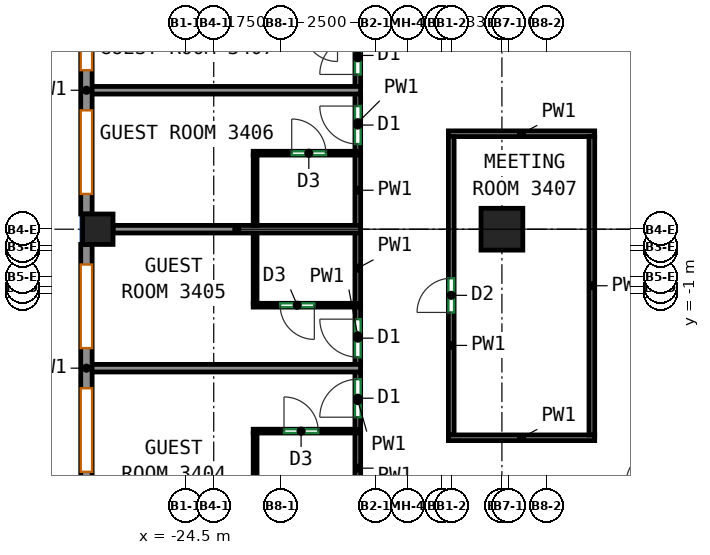
"""IFC4 building model, lengths in metres.
Left out: names, types, materials, properties, quantities, classifications, styles, units other than length and angle.
Written with IfcOpenShell. Run it as: python <this file> out.ifc"""

import sys

from ifc_helpers import new_model, si_unit, direction, frame, frame_2d, origin, origin_2d, place, context, subcontext, project, spatial, rectangle, extrude, source, transform, mapped, element, fill, save


model = new_model("IFC4")
c1 = context("Model", 3, precision=1e-05, world=origin(), true_north=direction((0.0, 1.0)))
c2 = subcontext(c1, "Body", "Model", "MODEL_VIEW")
j1 = project(units=[si_unit("LENGTHUNIT", "METRE"), si_unit("PLANEANGLEUNIT", "RADIAN")], contexts=[c1])
p1 = place(None, origin())
s1 = spatial("IfcSite", under=j1, at=p1, CompositionType="ELEMENT")
p2 = place(p1, origin())
s2 = spatial("IfcBuilding", under=s1, at=p2, CompositionType="ELEMENT")
p3 = place(p2, frame((0.0, 0.0, 150.7)))
s3 = spatial("IfcBuildingStorey", under=s2, at=p3, CompositionType="ELEMENT", Elevation=150.7)
m1 = source(origin(), c2, "Body", "SweptSolid", [
    extrude(rectangle(XDim=0.8, YDim=0.8, at=origin_2d()), origin(), (0.0, 0.0, 1.0), 3.12),
])
p4 = place(p3, frame((-26.8, 0.688, 0.0), z_axis=(0.0, 0.0, 1.0), x_axis=(1.0, 0.0, 0.0)))
e1 = element("IfcColumn", 1, at=p4, inside=s3, PredefinedType="COLUMN", context=c2, shape_type="MappedRepresentation", body=[
    mapped(m1, transform((0.0, 0.0, 0.0))),
])
m2 = source(origin(), c2, "Body", "SweptSolid", [
    extrude(rectangle(XDim=1.1, YDim=1.1, at=origin_2d()), origin(), (0.0, 0.0, 1.0), 3.12),
])
p5 = place(p3, frame((-16.167, 0.688, 0.0), z_axis=(0.0, 0.0, 1.0), x_axis=(1.0, 0.0, 0.0)))
e2 = element("IfcColumn", 2, at=p5, inside=s3, PredefinedType="COLUMN", context=c2, shape_type="MappedRepresentation", body=[
    mapped(m2, transform((0.0, 0.0, 0.0))),
])
m3 = source(origin(), c2, "Body", "SweptSolid", [
    extrude(rectangle(XDim=6.513, YDim=0.3, at=frame_2d((3.256, 0.0))), origin(), (0.0, 0.0, 1.0), 3.12),
])
p6 = place(p3, frame((-27.1, 7.6, 0.0), z_axis=(0.0, 0.0, 1.0), x_axis=(0.0, -1.0, 0.0)))
e3 = element("IfcWall", 3, at=p6, inside=s3, PredefinedType="SOLIDWALL", context=c2, shape_type="MappedRepresentation", body=[
    mapped(m3, transform((0.0, 0.0, 0.0))),
])
p7 = place(p6, frame((0.528, 0.0, 0.85)))
e4 = element("IfcOpeningElement", 4, at=p7, cuts=e3, PredefinedType="OPENING", context=c2, shape_type="SweptSolid", body=[
    extrude(rectangle(XDim=2.2, YDim=1.95, at=frame_2d((1.1, 0.975))), frame((0.0, 0.16, 0.0), z_axis=(0.0, -1.0, 0.0), x_axis=(1.0, 0.0, 0.0)), (0.0, 0.0, 1.0), 0.32),
])
p8 = place(p6, frame((3.784, 0.0, 0.85)))
e5 = element("IfcOpeningElement", 5, at=p8, cuts=e3, PredefinedType="OPENING", context=c2, shape_type="SweptSolid", body=[
    extrude(rectangle(XDim=2.2, YDim=1.95, at=frame_2d((1.1, 0.975))), frame((0.0, 0.16, 0.0), z_axis=(0.0, -1.0, 0.0), x_axis=(1.0, 0.0, 0.0)), (0.0, 0.0, 1.0), 0.32),
])
p9 = place(p3, frame((-27.1, 0.288, 0.0), z_axis=(0.0, 0.0, 1.0), x_axis=(0.0, -1.0, 0.0)))
e6 = element("IfcWall", 6, at=p9, inside=s3, PredefinedType="SOLIDWALL", context=c2, shape_type="MappedRepresentation", body=[
    mapped(m3, transform((0.0, 0.0, 0.0))),
])
p10 = place(p9, frame((0.528, 0.0, 0.85)))
e7 = element("IfcOpeningElement", 7, at=p10, cuts=e6, PredefinedType="OPENING", context=c2, shape_type="SweptSolid", body=[
    extrude(rectangle(XDim=2.2, YDim=1.95, at=frame_2d((1.1, 0.975))), frame((0.0, 0.16, 0.0), z_axis=(0.0, -1.0, 0.0), x_axis=(1.0, 0.0, 0.0)), (0.0, 0.0, 1.0), 0.32),
])
p11 = place(p9, frame((3.784, 0.0, 0.85)))
e8 = element("IfcOpeningElement", 8, at=p11, cuts=e6, PredefinedType="OPENING", context=c2, shape_type="SweptSolid", body=[
    extrude(rectangle(XDim=2.2, YDim=1.95, at=frame_2d((1.1, 0.975))), frame((0.0, 0.16, 0.0), z_axis=(0.0, -1.0, 0.0), x_axis=(1.0, 0.0, 0.0)), (0.0, 0.0, 1.0), 0.32),
])
p12 = place(p3, frame((-19.959, -4.585, 0.0), z_axis=(0.0, 0.0, 1.0), x_axis=(0.0, 1.0, 0.0)))
e9 = element("IfcWall", 9, at=p12, inside=s3, PredefinedType="PARTITIONING", context=c2, shape_type="SweptSolid", body=[
    extrude(rectangle(XDim=1.526, YDim=0.15, at=frame_2d((0.763, 0.0))), origin(), (0.0, 0.0, 1.0), 3.12),
])
p13 = place(p12, frame((0.326, 0.0, 0.0)))
e10 = element("IfcOpeningElement", 10, at=p13, cuts=e9, PredefinedType="OPENING", context=c2, shape_type="SweptSolid", body=[
    extrude(rectangle(XDim=1.0, YDim=2.1, at=frame_2d((0.5, 1.05))), frame((0.0, 0.085, 0.0), z_axis=(0.0, -1.0, 0.0), x_axis=(1.0, 0.0, 0.0)), (0.0, 0.0, 1.0), 0.17),
])
p14 = place(p3, frame((-19.959, -6.535, 0.0), z_axis=(0.0, 0.0, 1.0), x_axis=(0.0, 1.0, 0.0)))
e11 = element("IfcWall", 11, at=p14, inside=s3, PredefinedType="PARTITIONING", context=c2, shape_type="SweptSolid", body=[
    extrude(rectangle(XDim=1.87, YDim=0.15, at=frame_2d((0.935, 0.0))), origin(), (0.0, 0.0, 1.0), 3.12),
])
p15 = place(p3, frame((-19.959, -2.879, 0.0), z_axis=(0.0, 0.0, 1.0), x_axis=(0.0, 1.0, 0.0)))
e12 = element("IfcWall", 12, at=p15, inside=s3, PredefinedType="PARTITIONING", context=c2, shape_type="SweptSolid", body=[
    extrude(rectangle(XDim=1.527, YDim=0.15, at=frame_2d((0.763, 0.0))), origin(), (0.0, 0.0, 1.0), 3.12),
])
p16 = place(p15, frame((0.2, 0.0, 0.0)))
e13 = element("IfcOpeningElement", 13, at=p16, cuts=e12, PredefinedType="OPENING", context=c2, shape_type="SweptSolid", body=[
    extrude(rectangle(XDim=1.0, YDim=2.1, at=frame_2d((0.5, 1.05))), frame((0.0, 0.085, 0.0), z_axis=(0.0, -1.0, 0.0), x_axis=(1.0, 0.0, 0.0)), (0.0, 0.0, 1.0), 0.17),
])
p17 = place(p3, frame((-19.959, -1.272, 0.0), z_axis=(0.0, 0.0, 1.0), x_axis=(0.0, 1.0, 0.0)))
e14 = element("IfcWall", 14, at=p17, inside=s3, PredefinedType="PARTITIONING", context=c2, shape_type="SweptSolid", body=[
    extrude(rectangle(XDim=1.87, YDim=0.15, at=frame_2d((0.935, 0.0))), origin(), (0.0, 0.0, 1.0), 3.12),
])
p18 = place(p3, frame((-19.959, 2.728, 0.0), z_axis=(0.0, 0.0, 1.0), x_axis=(0.0, 1.0, 0.0)))
e15 = element("IfcWall", 15, at=p18, inside=s3, PredefinedType="PARTITIONING", context=c2, shape_type="SweptSolid", body=[
    extrude(rectangle(XDim=1.526, YDim=0.15, at=frame_2d((0.763, 0.0))), origin(), (0.0, 0.0, 1.0), 3.12),
])
p19 = place(p18, frame((0.2, 0.0, 0.0)))
e16 = element("IfcOpeningElement", 16, at=p19, cuts=e15, PredefinedType="OPENING", context=c2, shape_type="SweptSolid", body=[
    extrude(rectangle(XDim=1.0, YDim=2.1, at=frame_2d((0.5, 1.05))), frame((0.0, 0.085, 0.0), z_axis=(0.0, -1.0, 0.0), x_axis=(1.0, 0.0, 0.0)), (0.0, 0.0, 1.0), 0.17),
])
p20 = place(p3, frame((-19.959, 0.778, 0.0), z_axis=(0.0, 0.0, 1.0), x_axis=(0.0, 1.0, 0.0)))
e17 = element("IfcWall", 17, at=p20, inside=s3, PredefinedType="PARTITIONING", context=c2, shape_type="SweptSolid", body=[
    extrude(rectangle(XDim=1.87, YDim=0.15, at=frame_2d((0.935, 0.0))), origin(), (0.0, 0.0, 1.0), 3.12),
])
p21 = place(p3, frame((-19.959, 4.434, 0.0), z_axis=(0.0, 0.0, 1.0), x_axis=(0.0, 1.0, 0.0)))
e18 = element("IfcWall", 18, at=p21, inside=s3, PredefinedType="PARTITIONING", context=c2, shape_type="SweptSolid", body=[
    extrude(rectangle(XDim=1.526, YDim=0.15, at=frame_2d((0.763, 0.0))), origin(), (0.0, 0.0, 1.0), 3.12),
])
p22 = place(p21, frame((0.326, 0.0, 0.0)))
e19 = element("IfcOpeningElement", 19, at=p22, cuts=e18, PredefinedType="OPENING", context=c2, shape_type="SweptSolid", body=[
    extrude(rectangle(XDim=1.0, YDim=2.1, at=frame_2d((0.5, 1.05))), frame((0.0, 0.085, 0.0), z_axis=(0.0, -1.0, 0.0), x_axis=(1.0, 0.0, 0.0)), (0.0, 0.0, 1.0), 0.17),
])
p23 = place(p3, frame((-17.575, 3.2, 0.0), z_axis=(0.0, 0.0, 1.0), x_axis=(1.0, 0.0, 0.0)))
e20 = element("IfcWall", 20, at=p23, inside=s3, PredefinedType="PARTITIONING", context=c2, shape_type="SweptSolid", body=[
    extrude(rectangle(XDim=3.85, YDim=0.15, at=frame_2d((1.925, 0.0))), origin(), (0.0, 0.0, 1.0), 3.12),
])
p24 = place(p3, frame((-17.5, -4.725, 0.0), z_axis=(0.0, 0.0, 1.0), x_axis=(0.0, 1.0, 0.0)))
e21 = element("IfcWall", 21, at=p24, inside=s3, PredefinedType="PARTITIONING", context=c2, shape_type="SweptSolid", body=[
    extrude(rectangle(XDim=7.85, YDim=0.15, at=frame_2d((3.925, 0.0))), origin(), (0.0, 0.0, 1.0), 3.12),
])
p25 = place(p24, frame((3.223, 0.0, 0.0)))
e22 = element("IfcOpeningElement", 22, at=p25, cuts=e21, PredefinedType="OPENING", context=c2, shape_type="SweptSolid", body=[
    extrude(rectangle(XDim=0.9, YDim=2.1, at=frame_2d((0.45, 1.05))), frame((0.0, 0.085, 0.0), z_axis=(0.0, -1.0, 0.0), x_axis=(1.0, 0.0, 0.0)), (0.0, 0.0, 1.0), 0.17),
])
p26 = place(p3, frame((-13.725, -4.8, 0.0), z_axis=(0.0, 0.0, 1.0), x_axis=(-1.0, 0.0, 0.0)))
e23 = element("IfcWall", 23, at=p26, inside=s3, PredefinedType="PARTITIONING", context=c2, shape_type="SweptSolid", body=[
    extrude(rectangle(XDim=3.85, YDim=0.15, at=frame_2d((1.925, 0.0))), origin(), (0.0, 0.0, 1.0), 3.12),
])
p27 = place(p3, frame((-13.8, 3.125, 0.0), z_axis=(0.0, 0.0, 1.0), x_axis=(0.0, -1.0, 0.0)))
e24 = element("IfcWall", 24, at=p27, inside=s3, PredefinedType="PARTITIONING", context=c2, shape_type="SweptSolid", body=[
    extrude(rectangle(XDim=7.85, YDim=0.15, at=frame_2d((3.925, 0.0))), origin(), (0.0, 0.0, 1.0), 3.12),
])
p28 = place(p3, frame((-22.711, -4.625, 0.0), z_axis=(0.0, 0.0, 1.0), x_axis=(1.0, 0.0, 0.0)))
e25 = element("IfcWall", 25, at=p28, inside=s3, PredefinedType="PARTITIONING", context=c2, shape_type="SweptSolid", body=[
    extrude(rectangle(XDim=2.825, YDim=0.1, at=frame_2d((1.413, 0.0))), origin(), (0.0, 0.0, 1.0), 3.12),
])
p29 = place(p28, frame((0.81, 0.0, 0.0)))
e26 = element("IfcOpeningElement", 26, at=p29, cuts=e25, PredefinedType="OPENING", context=c2, shape_type="SweptSolid", body=[
    extrude(rectangle(XDim=0.9, YDim=2.1, at=frame_2d((0.45, 1.05))), frame((0.0, 0.06, 0.0), z_axis=(0.0, -1.0, 0.0), x_axis=(1.0, 0.0, 0.0)), (0.0, 0.0, 1.0), 0.12),
])
p30 = place(p3, frame((-22.661, -6.525, 0.0), z_axis=(0.0, 0.0, 1.0), x_axis=(0.0, 1.0, 0.0)))
e27 = element("IfcWall", 27, at=p30, inside=s3, PredefinedType="PARTITIONING", context=c2, shape_type="SweptSolid", body=[
    extrude(rectangle(XDim=1.85, YDim=0.1, at=frame_2d((0.925, 0.0))), origin(), (0.0, 0.0, 1.0), 3.12),
])
p31 = place(p3, frame((-19.886, -2.969, 0.0), z_axis=(0.0, 0.0, 1.0), x_axis=(-1.0, 0.0, 0.0)))
e28 = element("IfcWall", 28, at=p31, inside=s3, PredefinedType="PARTITIONING", context=c2, shape_type="SweptSolid", body=[
    extrude(rectangle(XDim=7.114, YDim=0.2, at=frame_2d((3.557, 0.0))), origin(), (0.0, 0.0, 1.0), 3.12),
])
p32 = place(p3, frame((-19.886, -1.312, 0.0), z_axis=(0.0, 0.0, 1.0), x_axis=(-1.0, 0.0, 0.0)))
e29 = element("IfcWall", 29, at=p32, inside=s3, PredefinedType="PARTITIONING", context=c2, shape_type="SweptSolid", body=[
    extrude(rectangle(XDim=2.825, YDim=0.1, at=frame_2d((1.413, 0.0))), origin(), (0.0, 0.0, 1.0), 3.12),
])
p33 = place(p32, frame((1.217, 0.0, 0.0)))
e30 = element("IfcOpeningElement", 30, at=p33, cuts=e29, PredefinedType="OPENING", context=c2, shape_type="SweptSolid", body=[
    extrude(rectangle(XDim=0.9, YDim=2.1, at=frame_2d((0.45, 1.05))), frame((0.0, 0.06, 0.0), z_axis=(0.0, -1.0, 0.0), x_axis=(1.0, 0.0, 0.0)), (0.0, 0.0, 1.0), 0.12),
])
p34 = place(p3, frame((-22.661, -1.262, 0.0), z_axis=(0.0, 0.0, 1.0), x_axis=(0.0, 1.0, 0.0)))
e31 = element("IfcWall", 31, at=p34, inside=s3, PredefinedType="PARTITIONING", context=c2, shape_type="SweptSolid", body=[
    extrude(rectangle(XDim=1.85, YDim=0.1, at=frame_2d((0.925, 0.0))), origin(), (0.0, 0.0, 1.0), 3.12),
])
p35 = place(p3, frame((-26.4, 0.688, 0.0), z_axis=(0.0, 0.0, 1.0), x_axis=(1.0, 0.0, 0.0)))
e32 = element("IfcWall", 32, at=p35, inside=s3, PredefinedType="PARTITIONING", context=c2, shape_type="SweptSolid", body=[
    extrude(rectangle(XDim=6.514, YDim=0.2, at=frame_2d((3.257, 0.0))), origin(), (0.0, 0.0, 1.0), 2.52),
])
p36 = place(p3, frame((-22.711, 2.688, 0.0), z_axis=(0.0, 0.0, 1.0), x_axis=(1.0, 0.0, 0.0)))
e33 = element("IfcWall", 33, at=p36, inside=s3, PredefinedType="PARTITIONING", context=c2, shape_type="SweptSolid", body=[
    extrude(rectangle(XDim=2.825, YDim=0.1, at=frame_2d((1.413, 0.0))), origin(), (0.0, 0.0, 1.0), 3.12),
])
p37 = place(p36, frame((1.013, 0.0, 0.0)))
e34 = element("IfcOpeningElement", 34, at=p37, cuts=e33, PredefinedType="OPENING", context=c2, shape_type="SweptSolid", body=[
    extrude(rectangle(XDim=0.9, YDim=2.1, at=frame_2d((0.45, 1.05))), frame((0.0, 0.06, 0.0), z_axis=(0.0, -1.0, 0.0), x_axis=(1.0, 0.0, 0.0)), (0.0, 0.0, 1.0), 0.12),
])
p38 = place(p3, frame((-22.661, 0.788, 0.0), z_axis=(0.0, 0.0, 1.0), x_axis=(0.0, 1.0, 0.0)))
e35 = element("IfcWall", 35, at=p38, inside=s3, PredefinedType="PARTITIONING", context=c2, shape_type="SweptSolid", body=[
    extrude(rectangle(XDim=1.85, YDim=0.1, at=frame_2d((0.925, 0.0))), origin(), (0.0, 0.0, 1.0), 3.12),
])
p39 = place(p3, frame((-27.0, 4.344, 0.0), z_axis=(0.0, 0.0, 1.0), x_axis=(1.0, 0.0, 0.0)))
e36 = element("IfcWall", 36, at=p39, inside=s3, PredefinedType="PARTITIONING", context=c2, shape_type="SweptSolid", body=[
    extrude(rectangle(XDim=7.114, YDim=0.2, at=frame_2d((3.557, 0.0))), origin(), (0.0, 0.0, 1.0), 3.12),
])
p40 = place(p7, origin())
e37 = element("IfcWindow", 37, at=p40, inside=s3, PartitioningType="SINGLE_PANEL", PredefinedType="WINDOW", context=c2, shape_type="SweptSolid", body=[
    extrude(rectangle(XDim=2.2, YDim=1.95, at=frame_2d((1.1, 0.975))), frame((0.0, 0.03, 0.0), z_axis=(0.0, -1.0, 0.0), x_axis=(1.0, 0.0, 0.0)), (0.0, 0.0, 1.0), 0.06),
])
fill(e4, e37)
p41 = place(p8, origin())
e38 = element("IfcWindow", 38, at=p41, inside=s3, PartitioningType="SINGLE_PANEL", PredefinedType="WINDOW", context=c2, shape_type="SweptSolid", body=[
    extrude(rectangle(XDim=2.2, YDim=1.95, at=frame_2d((1.1, 0.975))), frame((0.0, 0.03, 0.0), z_axis=(0.0, -1.0, 0.0), x_axis=(1.0, 0.0, 0.0)), (0.0, 0.0, 1.0), 0.06),
])
fill(e5, e38)
p42 = place(p10, origin())
e39 = element("IfcWindow", 39, at=p42, inside=s3, PartitioningType="SINGLE_PANEL", PredefinedType="WINDOW", context=c2, shape_type="SweptSolid", body=[
    extrude(rectangle(XDim=2.2, YDim=1.95, at=frame_2d((1.1, 0.975))), frame((0.0, 0.03, 0.0), z_axis=(0.0, -1.0, 0.0), x_axis=(1.0, 0.0, 0.0)), (0.0, 0.0, 1.0), 0.06),
])
fill(e7, e39)
p43 = place(p11, origin())
e40 = element("IfcWindow", 40, at=p43, inside=s3, PartitioningType="SINGLE_PANEL", PredefinedType="WINDOW", context=c2, shape_type="SweptSolid", body=[
    extrude(rectangle(XDim=2.2, YDim=1.95, at=frame_2d((1.1, 0.975))), frame((0.0, 0.03, 0.0), z_axis=(0.0, -1.0, 0.0), x_axis=(1.0, 0.0, 0.0)), (0.0, 0.0, 1.0), 0.06),
])
fill(e8, e40)
p44 = place(p29, origin())
e41 = element("IfcDoor", 41, at=p44, inside=s3, OperationType="SINGLE_SWING_LEFT", PredefinedType="DOOR", context=c2, shape_type="SweptSolid", body=[
    extrude(rectangle(XDim=0.9, YDim=2.1, at=frame_2d((0.45, 1.05))), frame((0.0, 0.025, 0.0), z_axis=(0.0, -1.0, 0.0), x_axis=(1.0, 0.0, 0.0)), (0.0, 0.0, 1.0), 0.05),
])
fill(e26, e41)
p45 = place(p13, origin())
e42 = element("IfcDoor", 42, at=p45, inside=s3, OperationType="SINGLE_SWING_LEFT", PredefinedType="DOOR", context=c2, shape_type="SweptSolid", body=[
    extrude(rectangle(XDim=1.0, YDim=2.1, at=frame_2d((0.5, 1.05))), frame((0.0, 0.025, 0.0), z_axis=(0.0, -1.0, 0.0), x_axis=(1.0, 0.0, 0.0)), (0.0, 0.0, 1.0), 0.05),
])
fill(e10, e42)
p46 = place(p16, origin())
e43 = element("IfcDoor", 43, at=p46, inside=s3, OperationType="SINGLE_SWING_RIGHT", PredefinedType="DOOR", context=c2, shape_type="SweptSolid", body=[
    extrude(rectangle(XDim=1.0, YDim=2.1, at=frame_2d((0.5, 1.05))), frame((0.0, 0.025, 0.0), z_axis=(0.0, -1.0, 0.0), x_axis=(1.0, 0.0, 0.0)), (0.0, 0.0, 1.0), 0.05),
])
fill(e13, e43)
p47 = place(p33, origin())
e44 = element("IfcDoor", 44, at=p47, inside=s3, OperationType="SINGLE_SWING_LEFT", PredefinedType="DOOR", context=c2, shape_type="SweptSolid", body=[
    extrude(rectangle(XDim=0.9, YDim=2.1, at=frame_2d((0.45, 1.05))), frame((0.0, 0.025, 0.0), z_axis=(0.0, -1.0, 0.0), x_axis=(1.0, 0.0, 0.0)), (0.0, 0.0, 1.0), 0.05),
])
fill(e30, e44)
p48 = place(p25, origin())
e45 = element("IfcDoor", 45, at=p48, inside=s3, OperationType="SINGLE_SWING_LEFT", PredefinedType="DOOR", context=c2, shape_type="SweptSolid", body=[
    extrude(rectangle(XDim=0.9, YDim=2.1, at=frame_2d((0.45, 1.05))), frame((0.0, 0.025, 0.0), z_axis=(0.0, -1.0, 0.0), x_axis=(1.0, 0.0, 0.0)), (0.0, 0.0, 1.0), 0.05),
])
fill(e22, e45)
p49 = place(p37, origin())
e46 = element("IfcDoor", 46, at=p49, inside=s3, OperationType="SINGLE_SWING_LEFT", PredefinedType="DOOR", context=c2, shape_type="SweptSolid", body=[
    extrude(rectangle(XDim=0.9, YDim=2.1, at=frame_2d((0.45, 1.05))), frame((0.0, 0.025, 0.0), z_axis=(0.0, -1.0, 0.0), x_axis=(1.0, 0.0, 0.0)), (0.0, 0.0, 1.0), 0.05),
])
fill(e34, e46)
p50 = place(p19, origin())
e47 = element("IfcDoor", 47, at=p50, inside=s3, OperationType="SINGLE_SWING_RIGHT", PredefinedType="DOOR", context=c2, shape_type="SweptSolid", body=[
    extrude(rectangle(XDim=1.0, YDim=2.1, at=frame_2d((0.5, 1.05))), frame((0.0, 0.025, 0.0), z_axis=(0.0, -1.0, 0.0), x_axis=(1.0, 0.0, 0.0)), (0.0, 0.0, 1.0), 0.05),
])
fill(e16, e47)
p51 = place(p22, origin())
e48 = element("IfcDoor", 48, at=p51, inside=s3, OperationType="SINGLE_SWING_LEFT", PredefinedType="DOOR", context=c2, shape_type="SweptSolid", body=[
    extrude(rectangle(XDim=1.0, YDim=2.1, at=frame_2d((0.5, 1.05))), frame((0.0, 0.025, 0.0), z_axis=(0.0, -1.0, 0.0), x_axis=(1.0, 0.0, 0.0)), (0.0, 0.0, 1.0), 0.05),
])
fill(e19, e48)
save(model, sys.argv[1])
